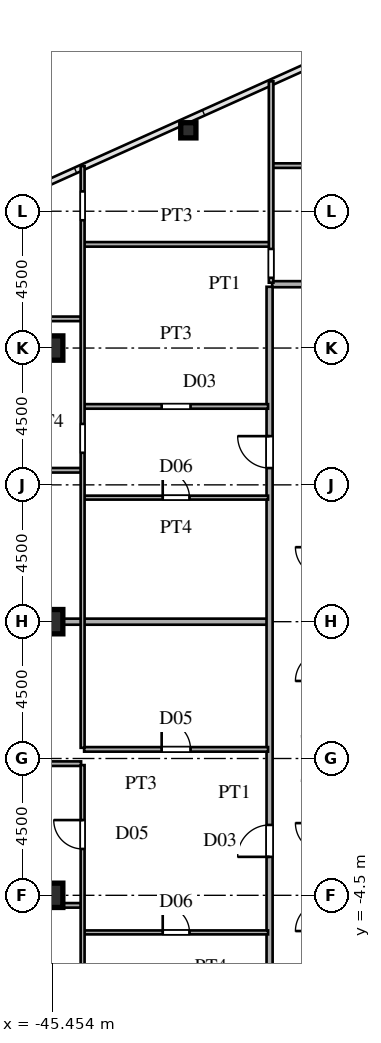
"""IFC4 building model, lengths in metres.
Left out: names, types, materials, properties, quantities, classifications, styles, units other than length and angle.
Written with IfcOpenShell. Run it as: python <this file> out.ifc"""

import sys

from ifc_helpers import new_model, si_unit, direction, frame, frame_2d, origin, origin_2d, place, context, subcontext, project, spatial, rectangle, hollow_rectangle, i_section, extrude, source, transform, mapped, element, fill, save


model = new_model("IFC4")
c1 = context("Model", 3, precision=1e-05, world=origin(), true_north=direction((0.0, 1.0)))
c2 = subcontext(c1, "Body", "Model", "MODEL_VIEW")
j1 = project(units=[si_unit("LENGTHUNIT", "METRE"), si_unit("PLANEANGLEUNIT", "RADIAN")], contexts=[c1])
p1 = place(None, origin())
s1 = spatial("IfcSite", under=j1, at=p1, CompositionType="ELEMENT")
p2 = place(p1, origin())
s2 = spatial("IfcBuilding", under=s1, at=p2, CompositionType="ELEMENT")
p3 = place(p2, frame((0.0, 0.0, 72.9)))
s3 = spatial("IfcBuildingStorey", under=s2, at=p3, CompositionType="ELEMENT", Elevation=72.9)
m1 = source(origin(), c2, "Body", "SweptSolid", [
    extrude(i_section(OverallWidth=0.8, OverallDepth=0.8, WebThickness=0.032, FlangeThickness=0.05, at=origin_2d()), origin(), (0.0, 0.0, 1.0), 3.6),
])
for number, where, z_axis, x_axis in (
    (1, (-45.5, -4.5, 0.0), (0.0, 0.0, 1.0), (1.0, 0.0, 0.0)),
    (2, (-45.5, 4.5, 0.0), (0.0, 0.0, 1.0), (1.0, 0.0, 0.0)),
    (3, (-45.5, 13.5, 0.0), (0.0, 0.0, 1.0), (1.0, 0.0, 0.0)),
):
    element("IfcColumn", number, at=place(p3, frame(where, z_axis=z_axis, x_axis=x_axis)), inside=s3, PredefinedType="COLUMN", context=c2, shape_type="MappedRepresentation", body=[
        mapped(m1, transform((0.0, 0.0, 0.0), scale=1.0)),
    ])
m2 = source(origin(), c2, "Body", "SweptSolid", [
    extrude(hollow_rectangle(XDim=0.5, YDim=0.5, WallThickness=0.02, at=origin_2d()), origin(), (0.0, 0.0, 1.0), 3.6),
])
p4 = place(p3, frame((-40.973, 20.661, 0.0), z_axis=(0.0, 0.0, 1.0), x_axis=(1.0, 0.0, 0.0)))
e4 = element("IfcColumn", 4, at=p4, inside=s3, PredefinedType="COLUMN", context=c2, shape_type="MappedRepresentation", body=[
    mapped(m2, transform((0.0, 0.0, 0.0), scale=1.0)),
])
p5 = place(p3, frame((-44.4, -5.72, 0.0), z_axis=(0.0, 0.0, 1.0), x_axis=(1.0, 0.0, 0.0)))
e5 = element("IfcWall", 5, at=p5, inside=s3, PredefinedType="PARTITIONING", context=c2, shape_type="SweptSolid", body=[
    extrude(rectangle(XDim=6.05, YDim=0.13, at=frame_2d((3.025, 0.0))), origin(), (0.0, 0.0, 1.0), 3.38),
])
p6 = place(p5, frame((2.585, 0.0, 0.0)))
e6 = element("IfcOpeningElement", 6, at=p6, cuts=e5, PredefinedType="OPENING", context=c2, shape_type="SweptSolid", body=[
    extrude(rectangle(XDim=0.88, YDim=2.1, at=frame_2d((0.44, 1.05))), frame((0.0, 0.075, 0.0), z_axis=(0.0, -1.0, 0.0), x_axis=(1.0, 0.0, 0.0)), (0.0, 0.0, 1.0), 0.15),
])
p7 = place(p3, frame((-71.035, -4.83, 0.0), z_axis=(0.0, 0.0, 1.0), x_axis=(1.0, 0.0, 0.0)))
e7 = element("IfcWall", 7, at=p7, inside=s3, PredefinedType="PARTITIONING", context=c2, shape_type="SweptSolid", body=[
    extrude(rectangle(XDim=26.535, YDim=0.15, at=frame_2d((13.268, 0.0))), origin(), (0.0, 0.0, 1.0), 3.38),
])
p8 = place(p7, frame((21.085, 0.0, 0.0)))
e8 = element("IfcOpeningElement", 8, at=p8, cuts=e7, PredefinedType="OPENING", context=c2, shape_type="SweptSolid", body=[
    extrude(rectangle(XDim=0.95, YDim=2.15, at=frame_2d((0.475, 1.075))), frame((0.0, 0.085, 0.0), z_axis=(0.0, -1.0, 0.0), x_axis=(1.0, 0.0, 0.0)), (0.0, 0.0, 1.0), 0.17),
])
p9 = place(p7, frame((13.21, 0.0, 0.0)))
e9 = element("IfcOpeningElement", 9, at=p9, cuts=e7, PredefinedType="OPENING", context=c2, shape_type="SweptSolid", body=[
    extrude(rectangle(XDim=0.95, YDim=2.15, at=frame_2d((0.475, 1.075))), frame((0.0, 0.085, 0.0), z_axis=(0.0, -1.0, 0.0), x_axis=(1.0, 0.0, 0.0)), (0.0, 0.0, 1.0), 0.17),
])
p10 = place(p3, frame((-71.035, -0.17, 0.0), z_axis=(0.0, 0.0, 1.0), x_axis=(1.0, 0.0, 0.0)))
e10 = element("IfcWall", 10, at=p10, inside=s3, PredefinedType="PARTITIONING", context=c2, shape_type="SweptSolid", body=[
    extrude(rectangle(XDim=26.535, YDim=0.15, at=frame_2d((13.268, 0.0))), origin(), (0.0, 0.0, 1.0), 3.38),
])
p11 = place(p10, frame((21.085, 0.0, 0.0)))
e11 = element("IfcOpeningElement", 11, at=p11, cuts=e10, PredefinedType="OPENING", context=c2, shape_type="SweptSolid", body=[
    extrude(rectangle(XDim=0.95, YDim=2.15, at=frame_2d((0.475, 1.075))), frame((0.0, 0.085, 0.0), z_axis=(0.0, -1.0, 0.0), x_axis=(1.0, 0.0, 0.0)), (0.0, 0.0, 1.0), 0.17),
])
p12 = place(p10, frame((13.21, 0.0, 0.0)))
e12 = element("IfcOpeningElement", 12, at=p12, cuts=e10, PredefinedType="OPENING", context=c2, shape_type="SweptSolid", body=[
    extrude(rectangle(XDim=0.95, YDim=2.15, at=frame_2d((0.475, 1.075))), frame((0.0, 0.085, 0.0), z_axis=(0.0, -1.0, 0.0), x_axis=(1.0, 0.0, 0.0)), (0.0, 0.0, 1.0), 0.17),
])
p13 = place(p3, frame((-44.4, 0.3, 0.0), z_axis=(0.0, 0.0, 1.0), x_axis=(1.0, 0.0, 0.0)))
e13 = element("IfcWall", 13, at=p13, inside=s3, PredefinedType="PARTITIONING", context=c2, shape_type="SweptSolid", body=[
    extrude(rectangle(XDim=6.05, YDim=0.15, at=frame_2d((3.025, 0.0))), origin(), (0.0, 0.0, 1.0), 3.38),
])
p14 = place(p13, frame((2.55, 0.0, 0.0)))
e14 = element("IfcOpeningElement", 14, at=p14, cuts=e13, PredefinedType="OPENING", context=c2, shape_type="SweptSolid", body=[
    extrude(rectangle(XDim=0.95, YDim=2.15, at=frame_2d((0.475, 1.075))), frame((0.0, 0.085, 0.0), z_axis=(0.0, -1.0, 0.0), x_axis=(1.0, 0.0, 0.0)), (0.0, 0.0, 1.0), 0.17),
])
p15 = place(p3, frame((-54.52, 4.5, 0.0), z_axis=(0.0, 0.0, 1.0), x_axis=(1.0, 0.0, 0.0)))
e15 = element("IfcWall", 15, at=p15, inside=s3, PredefinedType="PARTITIONING", context=c2, shape_type="SweptSolid", body=[
    extrude(rectangle(XDim=16.14, YDim=0.2, at=frame_2d((8.07, 0.0))), origin(), (0.0, 0.0, 1.0), 2.68),
])
p16 = place(p3, frame((-44.4, 8.58, 0.0), z_axis=(0.0, 0.0, 1.0), x_axis=(1.0, 0.0, 0.0)))
e16 = element("IfcWall", 16, at=p16, inside=s3, PredefinedType="PARTITIONING", context=c2, shape_type="SweptSolid", body=[
    extrude(rectangle(XDim=6.05, YDim=0.13, at=frame_2d((3.025, 0.0))), origin(), (0.0, 0.0, 1.0), 3.38),
])
p17 = place(p16, frame((2.585, 0.0, 0.0)))
e17 = element("IfcOpeningElement", 17, at=p17, cuts=e16, PredefinedType="OPENING", context=c2, shape_type="SweptSolid", body=[
    extrude(rectangle(XDim=0.88, YDim=2.1, at=frame_2d((0.44, 1.05))), frame((0.0, 0.075, 0.0), z_axis=(0.0, -1.0, 0.0), x_axis=(1.0, 0.0, 0.0)), (0.0, 0.0, 1.0), 0.15),
])
p18 = place(p3, frame((-66.629, 9.48, 0.0), z_axis=(0.0, 0.0, 1.0), x_axis=(1.0, 0.0, 0.0)))
e18 = element("IfcWall", 18, at=p18, inside=s3, PredefinedType="PARTITIONING", context=c2, shape_type="SweptSolid", body=[
    extrude(rectangle(XDim=22.129, YDim=0.15, at=frame_2d((11.064, 0.0))), origin(), (0.0, 0.0, 1.0), 3.38),
])
p19 = place(p18, frame((16.679, 0.0, 0.0)))
e19 = element("IfcOpeningElement", 19, at=p19, cuts=e18, PredefinedType="OPENING", context=c2, shape_type="SweptSolid", body=[
    extrude(rectangle(XDim=0.95, YDim=2.15, at=frame_2d((0.475, 1.075))), frame((0.0, 0.085, 0.0), z_axis=(0.0, -1.0, 0.0), x_axis=(1.0, 0.0, 0.0)), (0.0, 0.0, 1.0), 0.17),
])
p20 = place(p3, frame((-44.4, 11.58, 0.0), z_axis=(0.0, 0.0, 1.0), x_axis=(1.0, 0.0, 0.0)))
e20 = element("IfcWall", 20, at=p20, inside=s3, PredefinedType="PARTITIONING", context=c2, shape_type="SweptSolid", body=[
    extrude(rectangle(XDim=6.05, YDim=0.15, at=frame_2d((3.025, 0.0))), origin(), (0.0, 0.0, 1.0), 3.38),
])
p21 = place(p20, frame((2.55, 0.0, 0.0)))
e21 = element("IfcOpeningElement", 21, at=p21, cuts=e20, PredefinedType="OPENING", context=c2, shape_type="SweptSolid", body=[
    extrude(rectangle(XDim=0.95, YDim=2.15, at=frame_2d((0.475, 1.075))), frame((0.0, 0.085, 0.0), z_axis=(0.0, -1.0, 0.0), x_axis=(1.0, 0.0, 0.0)), (0.0, 0.0, 1.0), 0.17),
])
p22 = place(p3, frame((-54.45, 14.46, 0.0), z_axis=(0.0, 0.0, 1.0), x_axis=(1.0, 0.0, 0.0)))
e22 = element("IfcWall", 22, at=p22, inside=s3, PredefinedType="PARTITIONING", context=c2, shape_type="SweptSolid", body=[
    extrude(rectangle(XDim=9.95, YDim=0.15, at=frame_2d((4.975, 0.0))), origin(), (0.0, 0.0, 1.0), 3.38),
])
p23 = place(p22, frame((4.5, 0.0, 0.0)))
e23 = element("IfcOpeningElement", 23, at=p23, cuts=e22, PredefinedType="OPENING", context=c2, shape_type="SweptSolid", body=[
    extrude(rectangle(XDim=0.95, YDim=2.15, at=frame_2d((0.475, 1.075))), frame((0.0, 0.085, 0.0), z_axis=(0.0, -1.0, 0.0), x_axis=(1.0, 0.0, 0.0)), (0.0, 0.0, 1.0), 0.17),
])
p24 = place(p3, frame((-38.215, 15.6, 0.0), z_axis=(0.0, 0.0, 1.0), x_axis=(1.0, 0.0, 0.0)))
e24 = element("IfcWall", 24, at=p24, inside=s3, PredefinedType="PARTITIONING", context=c2, shape_type="SweptSolid", body=[
    extrude(rectangle(XDim=1.63, YDim=0.2, at=frame_2d((0.815, 0.0))), origin(), (0.0, 0.0, 1.0), 3.38),
])
p25 = place(p3, frame((-44.4, 16.91, 0.0), z_axis=(0.0, 0.0, 1.0), x_axis=(1.0, 0.0, 0.0)))
e25 = element("IfcWall", 25, at=p25, inside=s3, PredefinedType="PARTITIONING", context=c2, shape_type="SweptSolid", body=[
    extrude(rectangle(XDim=6.1, YDim=0.15, at=frame_2d((3.05, 0.0))), origin(), (0.0, 0.0, 1.0), 3.38),
])
p26 = place(p3, frame((-38.2, 19.5, 0.0), z_axis=(0.0, 0.0, 1.0), x_axis=(1.0, 0.0, 0.0)))
e26 = element("IfcWall", 26, at=p26, inside=s3, PredefinedType="PARTITIONING", context=c2, shape_type="SweptSolid", body=[
    extrude(rectangle(XDim=10.735, YDim=0.15, at=frame_2d((5.367, 0.0))), origin(), (0.0, 0.0, 1.0), 3.38),
])
p27 = place(p26, frame((4.85, 0.0, 0.0)))
e27 = element("IfcOpeningElement", 27, at=p27, cuts=e26, PredefinedType="OPENING", context=c2, shape_type="SweptSolid", body=[
    extrude(rectangle(XDim=0.95, YDim=2.15, at=frame_2d((0.475, 1.075))), frame((0.0, 0.085, 0.0), z_axis=(0.0, -1.0, 0.0), x_axis=(1.0, 0.0, 0.0)), (0.0, 0.0, 1.0), 0.17),
])
p28 = place(p3, frame((-44.45, -14.424, 0.0), z_axis=(0.0, 0.0, 1.0), x_axis=(0.0, 1.0, 0.0)))
e28 = element("IfcWall", 28, at=p28, inside=s3, PredefinedType="PARTITIONING", context=c2, shape_type="SweptSolid", body=[
    extrude(rectangle(XDim=14.207, YDim=0.13, at=frame_2d((7.104, 0.0))), origin(), (0.0, 0.0, 1.0), 3.38),
])
p29 = place(p28, frame((11.449, 0.0, 0.0)))
e29 = element("IfcOpeningElement", 29, at=p29, cuts=e28, PredefinedType="OPENING", context=c2, shape_type="SweptSolid", body=[
    extrude(rectangle(XDim=0.95, YDim=2.15, at=frame_2d((0.475, 1.075))), frame((0.0, 0.075, 0.0), z_axis=(0.0, -1.0, 0.0), x_axis=(1.0, 0.0, 0.0)), (0.0, 0.0, 1.0), 0.15),
])
p30 = place(p3, frame((-44.45, 0.352, 0.0), z_axis=(0.0, 0.0, 1.0), x_axis=(0.0, 1.0, 0.0)))
e30 = element("IfcWall", 30, at=p30, inside=s3, PredefinedType="PARTITIONING", context=c2, shape_type="SweptSolid", body=[
    extrude(rectangle(XDim=19.131, YDim=0.13, at=frame_2d((9.565, 0.0))), origin(), (0.0, 0.0, 1.0), 3.38),
])
p31 = place(p30, frame((9.703, 0.0, 0.0)))
e31 = element("IfcOpeningElement", 31, at=p31, cuts=e30, PredefinedType="OPENING", context=c2, shape_type="SweptSolid", body=[
    extrude(rectangle(XDim=0.95, YDim=2.15, at=frame_2d((0.475, 1.075))), frame((0.0, 0.075, 0.0), z_axis=(0.0, -1.0, 0.0), x_axis=(1.0, 0.0, 0.0)), (0.0, 0.0, 1.0), 0.15),
])
p32 = place(p30, frame((17.351, 0.0, 0.0)))
e32 = element("IfcOpeningElement", 32, at=p32, cuts=e30, PredefinedType="OPENING", context=c2, shape_type="SweptSolid", body=[
    extrude(rectangle(XDim=0.95, YDim=2.15, at=frame_2d((0.475, 1.075))), frame((0.0, 0.075, 0.0), z_axis=(0.0, -1.0, 0.0), x_axis=(1.0, 0.0, 0.0)), (0.0, 0.0, 1.0), 0.15),
])
p33 = place(p3, frame((-38.3, -15.515, 0.0), z_axis=(0.0, 0.0, 1.0), x_axis=(0.0, 1.0, 0.0)))
e33 = element("IfcWall", 33, at=p33, inside=s3, PredefinedType="PARTITIONING", context=c2, shape_type="SweptSolid", body=[
    extrude(rectangle(XDim=31.03, YDim=0.2, at=frame_2d((15.515, 0.0))), origin(), (0.0, 0.0, 1.0), 3.38),
])
p34 = place(p33, frame((1.345, 0.0, 0.0)))
e34 = element("IfcOpeningElement", 34, at=p34, cuts=e33, PredefinedType="OPENING", context=c2, shape_type="SweptSolid", body=[
    extrude(rectangle(XDim=1.05, YDim=2.25, at=frame_2d((0.525, 1.125))), frame((0.0, 0.11, 0.0), z_axis=(0.0, -1.0, 0.0), x_axis=(1.0, 0.0, 0.0)), (0.0, 0.0, 1.0), 0.22),
])
p35 = place(p33, frame((12.28, 0.0, 0.0)))
e35 = element("IfcOpeningElement", 35, at=p35, cuts=e33, PredefinedType="OPENING", context=c2, shape_type="SweptSolid", body=[
    extrude(rectangle(XDim=1.05, YDim=2.25, at=frame_2d((0.525, 1.125))), frame((0.0, 0.11, 0.0), z_axis=(0.0, -1.0, 0.0), x_axis=(1.0, 0.0, 0.0)), (0.0, 0.0, 1.0), 0.22),
])
p36 = place(p33, frame((25.067, 0.0, 0.0)))
e36 = element("IfcOpeningElement", 36, at=p36, cuts=e33, PredefinedType="OPENING", context=c2, shape_type="SweptSolid", body=[
    extrude(rectangle(XDim=1.05, YDim=2.25, at=frame_2d((0.525, 1.125))), frame((0.0, 0.11, 0.0), z_axis=(0.0, -1.0, 0.0), x_axis=(1.0, 0.0, 0.0)), (0.0, 0.0, 1.0), 0.22),
])
p37 = place(p3, frame((-38.25, 15.65, 0.0), z_axis=(0.0, 0.0, 1.0), x_axis=(0.0, 1.0, 0.0)))
e37 = element("IfcWall", 37, at=p37, inside=s3, PredefinedType="PARTITIONING", context=c2, shape_type="SweptSolid", body=[
    extrude(rectangle(XDim=6.623, YDim=0.15, at=frame_2d((3.312, 0.0))), origin(), (0.0, 0.0, 1.0), 3.38),
])
p38 = place(p37, frame((0.16, 0.0, 0.0)))
e38 = element("IfcOpeningElement", 38, at=p38, cuts=e37, PredefinedType="OPENING", context=c2, shape_type="SweptSolid", body=[
    extrude(rectangle(XDim=0.95, YDim=2.15, at=frame_2d((0.475, 1.075))), frame((0.0, 0.085, 0.0), z_axis=(0.0, -1.0, 0.0), x_axis=(1.0, 0.0, 0.0)), (0.0, 0.0, 1.0), 0.17),
])
m3 = source(origin(), c2, "Body", "SweptSolid", [
    extrude(rectangle(XDim=0.88, YDim=2.1, at=frame_2d((0.44, 1.05))), frame((0.0, 0.025, 0.0), z_axis=(0.0, -1.0, 0.0), x_axis=(1.0, 0.0, 0.0)), (0.0, 0.0, 1.0), 0.05),
])
p39 = place(p6, origin())
e39 = element("IfcDoor", 39, at=p39, inside=s3, OperationType="SINGLE_SWING_LEFT", PredefinedType="DOOR", context=c2, shape_type="MappedRepresentation", body=[
    mapped(m3, transform((0.0, 0.0, 0.0), scale=1.0)),
])
fill(e6, e39)
m4 = source(origin(), c2, "Body", "SweptSolid", [
    extrude(rectangle(XDim=0.95, YDim=2.15, at=frame_2d((0.475, 1.075))), frame((0.0, 0.025, 0.0), z_axis=(0.0, -1.0, 0.0), x_axis=(1.0, 0.0, 0.0)), (0.0, 0.0, 1.0), 0.05),
])
p40 = place(p14, origin())
e40 = element("IfcDoor", 40, at=p40, inside=s3, OperationType="SINGLE_SWING_LEFT", PredefinedType="DOOR", context=c2, shape_type="MappedRepresentation", body=[
    mapped(m4, transform((0.0, 0.0, 0.0), scale=1.0)),
])
fill(e14, e40)
p41 = place(p17, origin())
e41 = element("IfcDoor", 41, at=p41, inside=s3, OperationType="SINGLE_SWING_LEFT", PredefinedType="DOOR", context=c2, shape_type="MappedRepresentation", body=[
    mapped(m3, transform((0.0, 0.0, 0.0), scale=1.0)),
])
fill(e17, e41)
p42 = place(p29, origin())
e42 = element("IfcDoor", 42, at=p42, inside=s3, OperationType="SINGLE_SWING_RIGHT", PredefinedType="DOOR", context=c2, shape_type="MappedRepresentation", body=[
    mapped(m4, transform((0.0, 0.0, 0.0), scale=1.0)),
])
fill(e29, e42)
m5 = source(origin(), c2, "Body", "SweptSolid", [
    extrude(rectangle(XDim=1.05, YDim=2.25, at=frame_2d((0.525, 1.125))), frame((0.0, 0.025, 0.0), z_axis=(0.0, -1.0, 0.0), x_axis=(1.0, 0.0, 0.0)), (0.0, 0.0, 1.0), 0.05),
])
p43 = place(p35, origin())
e43 = element("IfcDoor", 43, at=p43, inside=s3, OperationType="SINGLE_SWING_LEFT", PredefinedType="DOOR", context=c2, shape_type="MappedRepresentation", body=[
    mapped(m5, transform((0.0, 0.0, 0.0), scale=1.0)),
])
fill(e35, e43)
p44 = place(p36, origin())
e44 = element("IfcDoor", 44, at=p44, inside=s3, OperationType="SINGLE_SWING_RIGHT", PredefinedType="DOOR", context=c2, shape_type="MappedRepresentation", body=[
    mapped(m5, transform((0.0, 0.0, 0.0), scale=1.0)),
])
fill(e36, e44)
save(model, sys.argv[1])
